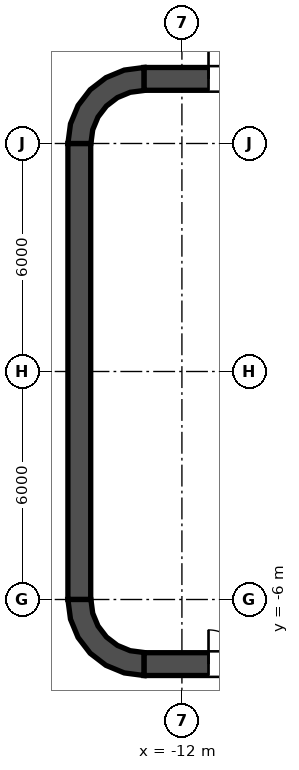
"""IFC4 building model, lengths in metres.
Left out: names, types, materials, properties, quantities, classifications, styles, units other than length and angle.
Written with IfcOpenShell. Run it as: python <this file> out.ifc"""

import sys

from ifc_helpers import new_model, si_unit, direction, frame, frame_2d, origin, place, context, subcontext, project, spatial, polyline, rectangle, outline, extrude, element, fill, save


model = new_model("IFC4")
c1 = context("Model", 3, precision=1e-05, world=origin(), true_north=direction((0.0, 1.0)))
c2 = subcontext(c1, "Body", "Model", "MODEL_VIEW")
j1 = project(units=[si_unit("LENGTHUNIT", "METRE"), si_unit("PLANEANGLEUNIT", "RADIAN")], contexts=[c1])
p1 = place(None, origin())
s1 = spatial("IfcSite", under=j1, at=p1, CompositionType="ELEMENT")
p2 = place(p1, origin())
s2 = spatial("IfcBuilding", under=s1, at=p2, CompositionType="ELEMENT")
p3 = place(p2, frame((0.0, 0.0, -5.0)))
s3 = spatial("IfcBuildingStorey", under=s2, at=p3, CompositionType="ELEMENT", Elevation=-5.0)
p4 = place(p3, frame((-13.0, 7.7, -0.3), z_axis=(0.0, 0.0, 1.0), x_axis=(1.0, 0.0, 0.0)))
e1 = element("IfcWall", 1, at=p4, inside=s3, PredefinedType="SHEAR", context=c2, shape_type="SweptSolid", body=[
    extrude(rectangle(XDim=26.0, YDim=0.6, at=frame_2d((13.0, 0.0))), origin(), (0.0, 0.0, 1.0), 5.3),
])
p5 = place(p4, frame((1.7, 0.0, 0.0)))
e2 = element("IfcOpeningElement", 2, at=p5, cuts=e1, PredefinedType="OPENING", context=c2, shape_type="SweptSolid", body=[
    extrude(rectangle(XDim=1.8, YDim=2.1, at=frame_2d((0.9, 1.05))), frame((0.0, 0.3, 0.0), z_axis=(0.0, -1.0, 0.0), x_axis=(1.0, 0.0, 0.0)), (0.0, 0.0, 1.0), 0.6),
])
p6 = place(p4, frame((22.5, 0.0, 0.0)))
e3 = element("IfcOpeningElement", 3, at=p6, cuts=e1, PredefinedType="OPENING", context=c2, shape_type="SweptSolid", body=[
    extrude(rectangle(XDim=1.8, YDim=2.1, at=frame_2d((0.9, 1.05))), frame((0.0, 0.3, 0.0), z_axis=(0.0, -1.0, 0.0), x_axis=(1.0, 0.0, 0.0)), (0.0, 0.0, 1.0), 0.6),
])
p7 = place(p3, frame((-13.0, -7.7, -0.3), z_axis=(0.0, 0.0, 1.0), x_axis=(1.0, 0.0, 0.0)))
e4 = element("IfcWall", 4, at=p7, inside=s3, PredefinedType="SHEAR", context=c2, shape_type="SweptSolid", body=[
    extrude(rectangle(XDim=26.0, YDim=0.6, at=frame_2d((13.0, 0.0))), origin(), (0.0, 0.0, 1.0), 5.3),
])
p8 = place(p7, frame((1.7, 0.0, 0.0)))
e5 = element("IfcOpeningElement", 5, at=p8, cuts=e4, PredefinedType="OPENING", context=c2, shape_type="SweptSolid", body=[
    extrude(rectangle(XDim=1.8, YDim=2.1, at=frame_2d((0.9, 1.05))), frame((0.0, 0.3, 0.0), z_axis=(0.0, -1.0, 0.0), x_axis=(1.0, 0.0, 0.0)), (0.0, 0.0, 1.0), 0.6),
])
p9 = place(p7, frame((22.5, 0.0, 0.0)))
e6 = element("IfcOpeningElement", 6, at=p9, cuts=e4, PredefinedType="OPENING", context=c2, shape_type="SweptSolid", body=[
    extrude(rectangle(XDim=1.8, YDim=2.1, at=frame_2d((0.9, 1.05))), frame((0.0, 0.3, 0.0), z_axis=(0.0, -1.0, 0.0), x_axis=(1.0, 0.0, 0.0)), (0.0, 0.0, 1.0), 0.6),
])
p10 = place(p3, frame((-14.7, -6.0, -0.3), z_axis=(0.0, 0.0, 1.0), x_axis=(0.0, 1.0, 0.0)))
e7 = element("IfcWall", 7, at=p10, inside=s3, PredefinedType="SHEAR", context=c2, shape_type="SweptSolid", body=[
    extrude(rectangle(XDim=12.0, YDim=0.6, at=frame_2d((6.0, 0.0))), origin(), (0.0, 0.0, 1.0), 5.3),
])
p11 = place(p3, frame((0.0, 0.0, -0.3)))
e8 = element("IfcWall", 8, at=p11, inside=s3, PredefinedType="SHEAR", context=c2, shape_type="SweptSolid", body=[
    extrude(outline(polyline([(-15.0, 6.0), (-14.395, 6.0), (-14.347, 6.361), (-14.208, 6.698), (-13.986, 6.986), (-13.698, 7.208), (-13.361, 7.347), (-13.0, 7.395), (-13.0, 8.0), (-13.518, 7.932), (-14.0, 7.732), (-14.414, 7.414), (-14.732, 7.0), (-14.932, 6.518), (-15.0, 6.0)])), origin(), (0.0, 0.0, 1.0), 5.3),
])
e9 = element("IfcWall", 9, at=p11, inside=s3, PredefinedType="SHEAR", context=c2, shape_type="SweptSolid", body=[
    extrude(outline(polyline([(-13.0, -8.0), (-13.0, -7.395), (-13.361, -7.347), (-13.698, -7.208), (-13.986, -6.986), (-14.208, -6.698), (-14.347, -6.361), (-14.395, -6.0), (-15.0, -6.0), (-14.932, -6.518), (-14.732, -7.0), (-14.414, -7.414), (-14.0, -7.732), (-13.518, -7.932), (-13.0, -8.0)])), origin(), (0.0, 0.0, 1.0), 5.3),
])
p12 = place(p3, frame((-11.8, -7.4, 0.0), z_axis=(0.0, 0.0, 1.0), x_axis=(0.0, 1.0, 0.0)))
e10 = element("IfcWall", 10, at=p12, inside=s3, PredefinedType="SOLIDWALL", context=c2, shape_type="SweptSolid", body=[
    extrude(rectangle(XDim=14.8, YDim=0.4, at=frame_2d((7.4, 0.0))), origin(), (0.0, 0.0, 1.0), 4.7),
])
p13 = place(p12, frame((13.552, 0.0, 0.0)))
e11 = element("IfcOpeningElement", 11, at=p13, cuts=e10, PredefinedType="OPENING", context=c2, shape_type="SweptSolid", body=[
    extrude(rectangle(XDim=0.9, YDim=2.1, at=frame_2d((0.45, 1.05))), frame((0.0, 0.2, 0.0), z_axis=(0.0, -1.0, 0.0), x_axis=(1.0, 0.0, 0.0)), (0.0, 0.0, 1.0), 0.4),
])
p14 = place(p12, frame((0.347, 0.0, 0.0)))
e12 = element("IfcOpeningElement", 12, at=p14, cuts=e10, PredefinedType="OPENING", context=c2, shape_type="SweptSolid", body=[
    extrude(rectangle(XDim=0.9, YDim=2.1, at=frame_2d((0.45, 1.05))), frame((0.0, 0.2, 0.0), z_axis=(0.0, -1.0, 0.0), x_axis=(1.0, 0.0, 0.0)), (0.0, 0.0, 1.0), 0.4),
])
p15 = place(p3, origin())
e13 = element("IfcWall", 13, at=p15, inside=s3, PredefinedType="SOLIDWALL", context=c2, shape_type="SweptSolid", body=[
    extrude(outline(polyline([(-12.0, -5.925), (-12.0, -5.675), (-14.15, -5.675), (-14.15, -3.025), (-12.0, -3.025), (-12.0, -2.775), (-14.15, -2.775), (-14.15, -0.125), (-12.0, -0.125), (-12.0, 0.125), (-14.15, 0.125), (-14.15, 2.775), (-12.0, 2.775), (-12.0, 3.025), (-14.15, 3.025), (-14.15, 5.675), (-12.0, 5.675), (-12.0, 5.925), (-14.15, 5.925), (-14.4, 5.925), (-14.4, 5.675), (-14.4, 3.025), (-14.4, 2.775), (-14.4, 0.125), (-14.4, -0.125), (-14.4, -2.775), (-14.4, -3.025), (-14.4, -5.675), (-14.4, -5.925), (-14.15, -5.925), (-12.0, -5.925)])), origin(), (0.0, 0.0, 1.0), 4.7),
])
p16 = place(p13, origin())
e14 = element("IfcDoor", 14, at=p16, inside=s3, OperationType="SINGLE_SWING_LEFT", PredefinedType="DOOR", context=c2, shape_type="SweptSolid", body=[
    extrude(rectangle(XDim=0.9, YDim=2.1, at=frame_2d((0.45, 1.05))), frame((0.0, 0.025, 0.0), z_axis=(0.0, -1.0, 0.0), x_axis=(1.0, 0.0, 0.0)), (0.0, 0.0, 1.0), 0.05),
])
fill(e11, e14)
p17 = place(p14, origin())
e15 = element("IfcDoor", 15, at=p17, inside=s3, OperationType="SINGLE_SWING_LEFT", PredefinedType="DOOR", context=c2, shape_type="SweptSolid", body=[
    extrude(rectangle(XDim=0.9, YDim=2.1, at=frame_2d((0.45, 1.05))), frame((0.0, 0.025, 0.0), z_axis=(0.0, -1.0, 0.0), x_axis=(1.0, 0.0, 0.0)), (0.0, 0.0, 1.0), 0.05),
])
fill(e12, e15)
p18 = place(p5, origin())
e16 = element("IfcDoor", 16, at=p18, inside=s3, OperationType="DOUBLE_DOOR_SINGLE_SWING", PredefinedType="DOOR", context=c2, shape_type="SweptSolid", body=[
    extrude(rectangle(XDim=1.8, YDim=2.1, at=frame_2d((0.9, 1.05))), frame((0.0, 0.025, 0.0), z_axis=(0.0, -1.0, 0.0), x_axis=(1.0, 0.0, 0.0)), (0.0, 0.0, 1.0), 0.05),
])
fill(e2, e16)
p19 = place(p8, origin())
e17 = element("IfcDoor", 17, at=p19, inside=s3, OperationType="DOUBLE_DOOR_SINGLE_SWING", PredefinedType="DOOR", context=c2, shape_type="SweptSolid", body=[
    extrude(rectangle(XDim=1.8, YDim=2.1, at=frame_2d((0.9, 1.05))), frame((0.0, 0.025, 0.0), z_axis=(0.0, -1.0, 0.0), x_axis=(1.0, 0.0, 0.0)), (0.0, 0.0, 1.0), 0.05),
])
fill(e5, e17)
save(model, sys.argv[1])
